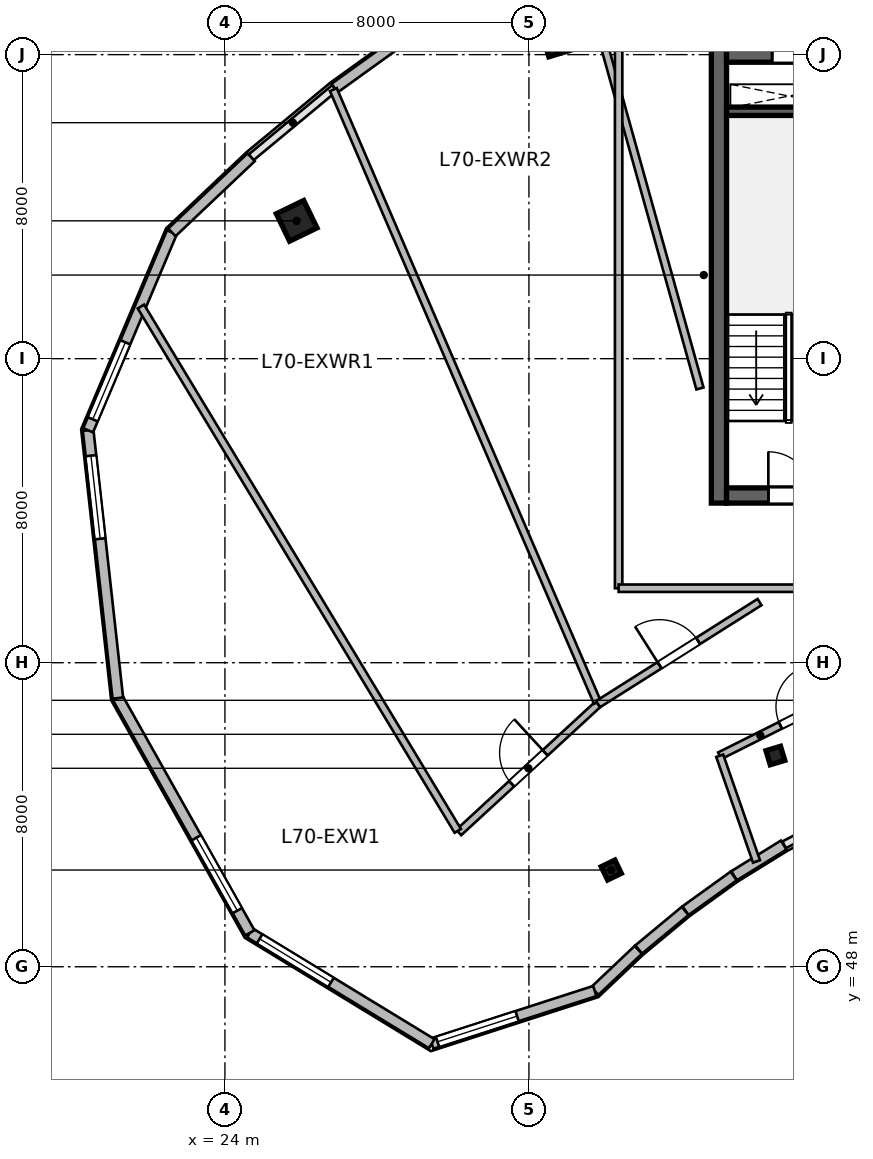
"""IFC4 building model, lengths in metres.
Left out: names, types, materials, properties, quantities, classifications, styles, units other than length and angle.
Written with IfcOpenShell. Run it as: python <this file> out.ifc"""

import sys

from ifc_helpers import new_model, si_unit, direction, frame, frame_2d, origin, origin_2d, place, context, subcontext, project, spatial, rectangle, i_section, extrude, source, transform, mapped, element, fill, save


model = new_model("IFC4")
c1 = context("Model", 3, precision=1e-05, world=origin(), true_north=direction((0.0, 1.0)))
c2 = subcontext(c1, "Body", "Model", "MODEL_VIEW")
j1 = project(units=[si_unit("LENGTHUNIT", "METRE"), si_unit("PLANEANGLEUNIT", "RADIAN")], contexts=[c1])
p1 = place(None, origin())
s1 = spatial("IfcSite", under=j1, at=p1, CompositionType="ELEMENT")
p2 = place(p1, origin())
s2 = spatial("IfcBuilding", under=s1, at=p2, CompositionType="ELEMENT")
p3 = place(p2, frame((0.0, 0.0, 287.4)))
s3 = spatial("IfcBuildingStorey", under=s2, at=p3, CompositionType="ELEMENT", Elevation=287.4)
m1 = source(origin(), c2, "Body", "SweptSolid", [
    extrude(rectangle(XDim=12.0, YDim=0.4, at=frame_2d((6.0, 0.0))), origin(), (0.0, 0.0, 1.0), 3.9),
])
p4 = place(p3, frame((37.0, 60.2, 0.0), z_axis=(0.0, 0.0, 1.0), x_axis=(0.0, 1.0, 0.0)))
e1 = element("IfcWall", 1, at=p4, inside=s3, PredefinedType="SHEAR", context=c2, shape_type="MappedRepresentation", body=[
    mapped(m1, transform((0.0, 0.0, 0.0), scale=1.0)),
])
m2 = source(origin(), c2, "Body", "SweptSolid", [
    extrude(rectangle(XDim=21.6, YDim=0.4, at=frame_2d((10.8, 0.0))), origin(), (0.0, 0.0, 1.0), 3.9),
])
p5 = place(p3, frame((37.2, 60.4, 0.0), z_axis=(0.0, 0.0, 1.0), x_axis=(1.0, 0.0, 0.0)))
e2 = element("IfcWall", 2, at=p5, inside=s3, PredefinedType="SHEAR", context=c2, shape_type="MappedRepresentation", body=[
    mapped(m2, transform((0.0, 0.0, 0.0), scale=1.0)),
])
p6 = place(p5, frame((1.1, 0.0, 0.0)))
e3 = element("IfcOpeningElement", 3, at=p6, cuts=e2, PredefinedType="OPENING", context=c2, shape_type="SweptSolid", body=[
    extrude(rectangle(XDim=1.15, YDim=2.15, at=frame_2d((0.575, 1.075))), frame((0.0, 0.21, 0.0), z_axis=(0.0, -1.0, 0.0), x_axis=(1.0, 0.0, 0.0)), (0.0, 0.0, 1.0), 0.42),
])
p7 = place(p5, frame((19.5, 0.0, 0.0)))
e4 = element("IfcOpeningElement", 4, at=p7, cuts=e2, PredefinedType="OPENING", context=c2, shape_type="SweptSolid", body=[
    extrude(rectangle(XDim=0.9, YDim=2.1, at=frame_2d((0.45, 1.05))), frame((0.0, 0.21, 0.0), z_axis=(0.0, -1.0, 0.0), x_axis=(1.0, 0.0, 0.0)), (0.0, 0.0, 1.0), 0.42),
])
p8 = place(p5, frame((12.02, 0.0, 0.0)))
e5 = element("IfcOpeningElement", 5, at=p8, cuts=e2, PredefinedType="OPENING", context=c2, shape_type="SweptSolid", body=[
    extrude(rectangle(XDim=1.6, YDim=2.15, at=frame_2d((0.8, 1.075))), frame((0.0, 0.21, 0.0), z_axis=(0.0, -1.0, 0.0), x_axis=(1.0, 0.0, 0.0)), (0.0, 0.0, 1.0), 0.42),
])
p9 = place(p3, frame((37.2, 72.0, 0.0), z_axis=(0.0, 0.0, 1.0), x_axis=(1.0, 0.0, 0.0)))
e6 = element("IfcWall", 6, at=p9, inside=s3, PredefinedType="SHEAR", context=c2, shape_type="MappedRepresentation", body=[
    mapped(m2, transform((0.0, 0.0, 0.0), scale=1.0)),
])
p10 = place(p9, frame((1.2, 0.0, 0.0)))
e7 = element("IfcOpeningElement", 7, at=p10, cuts=e6, PredefinedType="OPENING", context=c2, shape_type="SweptSolid", body=[
    extrude(rectangle(XDim=0.9, YDim=2.1, at=frame_2d((0.45, 1.05))), frame((0.0, 0.21, 0.0), z_axis=(0.0, -1.0, 0.0), x_axis=(1.0, 0.0, 0.0)), (0.0, 0.0, 1.0), 0.42),
])
p11 = place(p9, frame((14.7, 0.0, 0.0)))
e8 = element("IfcOpeningElement", 8, at=p11, cuts=e6, PredefinedType="OPENING", context=c2, shape_type="SweptSolid", body=[
    extrude(rectangle(XDim=1.2, YDim=2.15, at=frame_2d((0.6, 1.075))), frame((0.0, 0.21, 0.0), z_axis=(0.0, -1.0, 0.0), x_axis=(1.0, 0.0, 0.0)), (0.0, 0.0, 1.0), 0.42),
])
p12 = place(p9, frame((4.15, 0.0, 0.0)))
e9 = element("IfcOpeningElement", 9, at=p12, cuts=e6, PredefinedType="OPENING", context=c2, shape_type="SweptSolid", body=[
    extrude(rectangle(XDim=1.3, YDim=2.15, at=frame_2d((0.65, 1.075))), frame((0.0, 0.21, 0.0), z_axis=(0.0, -1.0, 0.0), x_axis=(1.0, 0.0, 0.0)), (0.0, 0.0, 1.0), 0.42),
])
p13 = place(p9, frame((7.1, 0.0, 0.0)))
e10 = element("IfcOpeningElement", 10, at=p13, cuts=e6, PredefinedType="OPENING", context=c2, shape_type="SweptSolid", body=[
    extrude(rectangle(XDim=0.9, YDim=2.1, at=frame_2d((0.45, 1.05))), frame((0.0, 0.21, 0.0), z_axis=(0.0, -1.0, 0.0), x_axis=(1.0, 0.0, 0.0)), (0.0, 0.0, 1.0), 0.42),
])
m3 = source(origin(), c2, "Body", "SweptSolid", [
    extrude(rectangle(XDim=3.27, YDim=0.22, at=frame_2d((1.635, 0.0))), origin(), (0.0, 0.0, 1.0), 3.9),
])
p14 = place(p3, frame((37.2, 70.51, 0.0), z_axis=(0.0, 0.0, 1.0), x_axis=(1.0, 0.0, 0.0)))
e11 = element("IfcWall", 11, at=p14, inside=s3, PredefinedType="SHEAR", context=c2, shape_type="MappedRepresentation", body=[
    mapped(m3, transform((0.0, 0.0, 0.0), scale=1.0)),
])
m4 = source(origin(), c2, "Body", "SweptSolid", [
    extrude(i_section(OverallWidth=0.399, OverallDepth=0.387, WebThickness=0.021, FlangeThickness=0.033, at=origin_2d()), origin(), (0.0, 0.0, 1.0), 3.9),
])
p15 = place(p3, frame((34.166, 50.545, 0.0), z_axis=(0.0, 0.0, 1.0), x_axis=(-0.436173672171, 0.899862504889, 0.0)))
e12 = element("IfcColumn", 12, at=p15, inside=s3, PredefinedType="COLUMN", context=c2, shape_type="MappedRepresentation", body=[
    mapped(m4, transform((0.0, 0.0, 0.0), scale=1.0)),
])
m5 = source(origin(), c2, "Body", "SweptSolid", [
    extrude(rectangle(XDim=0.8, YDim=0.8, at=origin_2d()), origin(), (0.0, 0.0, 1.0), 3.9),
])
p16 = place(p3, frame((25.888, 67.627, 0.0), z_axis=(0.0, 0.0, 1.0), x_axis=(-0.436173672171, 0.899862504889, 0.0)))
e13 = element("IfcColumn", 13, at=p16, inside=s3, PredefinedType="COLUMN", context=c2, shape_type="MappedRepresentation", body=[
    mapped(m5, transform((0.0, 0.0, 0.0), scale=1.0)),
])
p17 = place(p3, frame((38.485, 53.558, 0.0), z_axis=(0.0, 0.0, 1.0), x_axis=(-0.288697611798, 0.957420330337, 0.0)))
e14 = element("IfcColumn", 14, at=p17, inside=s3, PredefinedType="COLUMN", context=c2, shape_type="MappedRepresentation", body=[
    mapped(m4, transform((0.0, 0.0, 0.0), scale=1.0)),
])
p18 = place(p3, frame((32.791, 72.442, 0.0), z_axis=(0.0, 0.0, 1.0), x_axis=(-0.288697611798, 0.957420330337, 0.0)))
e15 = element("IfcColumn", 15, at=p18, inside=s3, PredefinedType="COLUMN", context=c2, shape_type="MappedRepresentation", body=[
    mapped(m5, transform((0.0, 0.0, 0.0), scale=1.0)),
])
m6 = source(origin(), c2, "Body", "SweptSolid", [
    extrude(rectangle(XDim=1.535, YDim=0.28, at=frame_2d((0.768, 0.0))), origin(), (0.0, 0.0, 1.0), 3.64),
])
p19 = place(p3, frame((38.704, 51.201, 0.0), z_axis=(0.0, 0.0, 1.0), x_axis=(-0.850756173541, -0.525560589449, 0.0)))
e16 = element("IfcWall", 16, at=p19, inside=s3, PredefinedType="SOLIDWALL", context=c2, shape_type="MappedRepresentation", body=[
    mapped(m6, transform((0.0, 0.0, 0.0), scale=1.0)),
])
m7 = source(origin(), c2, "Body", "SweptSolid", [
    extrude(rectangle(XDim=1.561, YDim=0.28, at=frame_2d((0.781, 0.0))), origin(), (0.0, 0.0, 1.0), 3.64),
])
p20 = place(p3, frame((37.387, 50.387, 0.0), z_axis=(0.0, 0.0, 1.0), x_axis=(-0.81154027425, -0.584296485758, 0.0)))
e17 = element("IfcWall", 17, at=p20, inside=s3, PredefinedType="SOLIDWALL", context=c2, shape_type="MappedRepresentation", body=[
    mapped(m7, transform((0.0, 0.0, 0.0), scale=1.0)),
])
m8 = source(origin(), c2, "Body", "SweptSolid", [
    extrude(rectangle(XDim=1.589, YDim=0.28, at=frame_2d((0.794, 0.0))), origin(), (0.0, 0.0, 1.0), 3.64),
])
p21 = place(p3, frame((36.11, 49.468, 0.0), z_axis=(0.0, 0.0, 1.0), x_axis=(-0.769805836273, -0.63827813251, 0.0)))
e18 = element("IfcWall", 18, at=p21, inside=s3, PredefinedType="SOLIDWALL", context=c2, shape_type="MappedRepresentation", body=[
    mapped(m8, transform((0.0, 0.0, 0.0), scale=1.0)),
])
m9 = source(origin(), c2, "Body", "SweptSolid", [
    extrude(rectangle(XDim=1.577, YDim=0.28, at=frame_2d((0.789, 0.0))), origin(), (0.0, 0.0, 1.0), 3.64),
])
p22 = place(p3, frame((34.878, 48.446, 0.0), z_axis=(0.0, 0.0, 1.0), x_axis=(-0.726119464467, -0.687568558998, 0.0)))
e19 = element("IfcWall", 19, at=p22, inside=s3, PredefinedType="SOLIDWALL", context=c2, shape_type="MappedRepresentation", body=[
    mapped(m9, transform((0.0, 0.0, 0.0), scale=1.0)),
])
m10 = source(origin(), c2, "Body", "SweptSolid", [
    extrude(rectangle(XDim=4.509, YDim=0.28, at=frame_2d((2.255, 0.0))), origin(), (0.0, 0.0, 1.0), 3.64),
])
p23 = place(p3, frame((33.733, 47.361, 0.0), z_axis=(0.0, 0.0, 1.0), x_axis=(-0.95162949292, -0.307247958828, 0.0)))
e20 = element("IfcWall", 20, at=p23, inside=s3, PredefinedType="SOLIDWALL", context=c2, shape_type="MappedRepresentation", body=[
    mapped(m10, transform((0.0, 0.0, 0.0), scale=1.0)),
])
p24 = place(p23, frame((2.149, 0.0, 0.95)))
e21 = element("IfcOpeningElement", 21, at=p24, cuts=e20, PredefinedType="OPENING", context=c2, shape_type="SweptSolid", body=[
    extrude(rectangle(XDim=2.2, YDim=2.1, at=frame_2d((1.1, 1.05))), frame((0.0, 0.15, 0.0), z_axis=(0.0, -1.0, 0.0), x_axis=(1.0, 0.0, 0.0)), (0.0, 0.0, 1.0), 0.3),
])
m11 = source(origin(), c2, "Body", "SweptSolid", [
    extrude(rectangle(XDim=5.604, YDim=0.28, at=frame_2d((2.802, 0.0))), origin(), (0.0, 0.0, 1.0), 3.64),
])
p25 = place(p3, frame((29.442, 45.976, 0.0), z_axis=(0.0, 0.0, 1.0), x_axis=(-0.854002492971, 0.520268913158, 0.0)))
e22 = element("IfcWall", 22, at=p25, inside=s3, PredefinedType="SOLIDWALL", context=c2, shape_type="MappedRepresentation", body=[
    mapped(m11, transform((0.0, 0.0, 0.0), scale=1.0)),
])
p26 = place(p25, frame((3.103, 0.0, 0.95)))
e23 = element("IfcOpeningElement", 23, at=p26, cuts=e22, PredefinedType="OPENING", context=c2, shape_type="SweptSolid", body=[
    extrude(rectangle(XDim=2.2, YDim=2.1, at=frame_2d((1.1, 1.05))), frame((0.0, 0.15, 0.0), z_axis=(0.0, -1.0, 0.0), x_axis=(1.0, 0.0, 0.0)), (0.0, 0.0, 1.0), 0.3),
])
m12 = source(origin(), c2, "Body", "SweptSolid", [
    extrude(rectangle(XDim=7.087, YDim=0.28, at=frame_2d((3.543, 0.0))), origin(), (0.0, 0.0, 1.0), 3.64),
])
p27 = place(p3, frame((24.656, 48.892, 0.0), z_axis=(0.0, 0.0, 1.0), x_axis=(-0.490158199368, 0.871633489256, 0.0)))
e24 = element("IfcWall", 24, at=p27, inside=s3, PredefinedType="SOLIDWALL", context=c2, shape_type="MappedRepresentation", body=[
    mapped(m12, transform((0.0, 0.0, 0.0), scale=1.0)),
])
p28 = place(p27, frame((0.672, 0.0, 0.95)))
e25 = element("IfcOpeningElement", 25, at=p28, cuts=e24, PredefinedType="OPENING", context=c2, shape_type="SweptSolid", body=[
    extrude(rectangle(XDim=2.2, YDim=2.1, at=frame_2d((1.1, 1.05))), frame((0.0, 0.15, 0.0), z_axis=(0.0, -1.0, 0.0), x_axis=(1.0, 0.0, 0.0)), (0.0, 0.0, 1.0), 0.3),
])
m13 = source(origin(), c2, "Body", "SweptSolid", [
    extrude(rectangle(XDim=7.09, YDim=0.28, at=frame_2d((3.545, 0.0))), origin(), (0.0, 0.0, 1.0), 3.64),
])
p29 = place(p3, frame((21.182, 55.069, 0.0), z_axis=(0.0, 0.0, 1.0), x_axis=(-0.110159396922, 0.993913933532, 0.0)))
e26 = element("IfcWall", 26, at=p29, inside=s3, PredefinedType="SOLIDWALL", context=c2, shape_type="MappedRepresentation", body=[
    mapped(m13, transform((0.0, 0.0, 0.0), scale=1.0)),
])
p30 = place(p29, frame((4.217, 0.0, 0.95)))
e27 = element("IfcOpeningElement", 27, at=p30, cuts=e26, PredefinedType="OPENING", context=c2, shape_type="SweptSolid", body=[
    extrude(rectangle(XDim=2.2, YDim=2.1, at=frame_2d((1.1, 1.05))), frame((0.0, 0.15, 0.0), z_axis=(0.0, -1.0, 0.0), x_axis=(1.0, 0.0, 0.0)), (0.0, 0.0, 1.0), 0.3),
])
m14 = source(origin(), c2, "Body", "SweptSolid", [
    extrude(rectangle(XDim=5.655, YDim=0.28, at=frame_2d((2.828, 0.0))), origin(), (0.0, 0.0, 1.0), 3.64),
])
p31 = place(p3, frame((20.401, 62.116, 0.0), z_axis=(0.0, 0.0, 1.0), x_axis=(0.389585063528, 0.920990487614, 0.0)))
e28 = element("IfcWall", 28, at=p31, inside=s3, PredefinedType="SOLIDWALL", context=c2, shape_type="MappedRepresentation", body=[
    mapped(m14, transform((0.0, 0.0, 0.0), scale=1.0)),
])
p32 = place(p31, frame((0.314, 0.0, 0.95)))
e29 = element("IfcOpeningElement", 29, at=p32, cuts=e28, PredefinedType="OPENING", context=c2, shape_type="SweptSolid", body=[
    extrude(rectangle(XDim=2.2, YDim=2.1, at=frame_2d((1.1, 1.05))), frame((0.0, 0.15, 0.0), z_axis=(0.0, -1.0, 0.0), x_axis=(1.0, 0.0, 0.0)), (0.0, 0.0, 1.0), 0.3),
])
m15 = source(origin(), c2, "Body", "SweptSolid", [
    extrude(rectangle(XDim=2.873, YDim=0.28, at=frame_2d((1.436, 0.0))), origin(), (0.0, 0.0, 1.0), 3.64),
])
p33 = place(p3, frame((22.604, 67.324, 0.0), z_axis=(0.0, 0.0, 1.0), x_axis=(0.72609560544, 0.687593754888, 0.0)))
e30 = element("IfcWall", 30, at=p33, inside=s3, PredefinedType="SOLIDWALL", context=c2, shape_type="MappedRepresentation", body=[
    mapped(m15, transform((0.0, 0.0, 0.0), scale=1.0)),
])
m16 = source(origin(), c2, "Body", "SweptSolid", [
    extrude(rectangle(XDim=2.802, YDim=0.28, at=frame_2d((1.401, 0.0))), origin(), (0.0, 0.0, 1.0), 3.64),
])
p34 = place(p3, frame((26.885, 71.12, 0.0), z_axis=(0.0, 0.0, 1.0), x_axis=(0.811507896482, 0.584341453217, 0.0)))
e31 = element("IfcWall", 31, at=p34, inside=s3, PredefinedType="SOLIDWALL", context=c2, shape_type="MappedRepresentation", body=[
    mapped(m16, transform((0.0, 0.0, 0.0), scale=1.0)),
])
m17 = source(origin(), c2, "Body", "SweptSolid", [
    extrude(rectangle(XDim=4.271, YDim=0.195, at=frame_2d((2.135, 0.0))), origin(), (0.0, 0.0, 1.0), 3.64),
])
p35 = place(p3, frame((37.021, 53.552, 0.0), z_axis=(0.0, 0.0, 1.0), x_axis=(0.894061035522, 0.447945158207, 0.0)))
e32 = element("IfcWall", 32, at=p35, inside=s3, PredefinedType="PARTITIONING", context=c2, shape_type="MappedRepresentation", body=[
    mapped(m17, transform((0.0, 0.0, 0.0), scale=1.0)),
])
p36 = place(p35, frame((1.785, 0.0, 0.0)))
e33 = element("IfcOpeningElement", 33, at=p36, cuts=e32, PredefinedType="OPENING", context=c2, shape_type="SweptSolid", body=[
    extrude(rectangle(XDim=1.1, YDim=2.15, at=frame_2d((0.55, 1.075))), frame((0.0, 0.107, 0.0), z_axis=(0.0, -1.0, 0.0), x_axis=(1.0, 0.0, 0.0)), (0.0, 0.0, 1.0), 0.215),
])
m18 = source(origin(), c2, "Body", "SweptSolid", [
    extrude(rectangle(XDim=2.944, YDim=0.195, at=frame_2d((1.472, 0.0))), origin(), (0.0, 0.0, 1.0), 3.64),
])
p37 = place(p3, frame((37.988, 50.771, 0.0), z_axis=(0.0, 0.0, 1.0), x_axis=(-0.328565655286, 0.944481132774, 0.0)))
e34 = element("IfcWall", 34, at=p37, inside=s3, PredefinedType="PARTITIONING", context=c2, shape_type="MappedRepresentation", body=[
    mapped(m18, transform((0.0, 0.0, 0.0), scale=1.0)),
])
m19 = source(origin(), c2, "Body", "SweptSolid", [
    extrude(rectangle(XDim=4.986, YDim=0.195, at=frame_2d((2.493, 0.0))), origin(), (0.0, 0.0, 1.0), 3.64),
])
p38 = place(p3, frame((30.153, 51.533, 0.0), z_axis=(0.0, 0.0, 1.0), x_axis=(0.735595190169, 0.677421372707, 0.0)))
e35 = element("IfcWall", 35, at=p38, inside=s3, PredefinedType="PARTITIONING", context=c2, shape_type="MappedRepresentation", body=[
    mapped(m19, transform((0.0, 0.0, 0.0), scale=1.0)),
])
p39 = place(p38, frame((1.893, 0.0, 0.0)))
e36 = element("IfcOpeningElement", 36, at=p39, cuts=e35, PredefinedType="OPENING", context=c2, shape_type="SweptSolid", body=[
    extrude(rectangle(XDim=1.2, YDim=2.15, at=frame_2d((0.6, 1.075))), frame((0.0, 0.107, 0.0), z_axis=(0.0, -1.0, 0.0), x_axis=(1.0, 0.0, 0.0)), (0.0, 0.0, 1.0), 0.215),
])
m20 = source(origin(), c2, "Body", "SweptSolid", [
    extrude(rectangle(XDim=16.121, YDim=0.195, at=frame_2d((8.061, 0.0))), origin(), (0.0, 0.0, 1.0), 3.64),
])
p40 = place(p3, frame((30.127, 51.575, 0.0), z_axis=(0.0, 0.0, 1.0), x_axis=(-0.517212483904, 0.855857024563, 0.0)))
e37 = element("IfcWall", 37, at=p40, inside=s3, PredefinedType="PARTITIONING", context=c2, shape_type="MappedRepresentation", body=[
    mapped(m20, transform((0.0, 0.0, 0.0), scale=1.0)),
])
m21 = source(origin(), c2, "Body", "SweptSolid", [
    extrude(rectangle(XDim=17.556, YDim=0.195, at=frame_2d((8.778, 0.0))), origin(), (0.0, 0.0, 1.0), 3.64),
])
p41 = place(p3, frame((33.8, 54.958, 0.0), z_axis=(0.0, 0.0, 1.0), x_axis=(-0.395687598313, 0.918385172213, 0.0)))
e38 = element("IfcWall", 38, at=p41, inside=s3, PredefinedType="PARTITIONING", context=c2, shape_type="MappedRepresentation", body=[
    mapped(m21, transform((0.0, 0.0, 0.0), scale=1.0)),
])
m22 = source(origin(), c2, "Body", "SweptSolid", [
    extrude(rectangle(XDim=5.025, YDim=0.195, at=frame_2d((2.513, 0.0))), origin(), (0.0, 0.0, 1.0), 3.64),
])
p42 = place(p3, frame((33.82, 54.911, 0.0), z_axis=(0.0, 0.0, 1.0), x_axis=(0.84532378062, 0.534254345717, 0.0)))
e39 = element("IfcWall", 39, at=p42, inside=s3, PredefinedType="PARTITIONING", context=c2, shape_type="MappedRepresentation", body=[
    mapped(m22, transform((0.0, 0.0, 0.0), scale=1.0)),
])
p43 = place(p42, frame((1.913, 0.0, 0.0)))
e40 = element("IfcOpeningElement", 40, at=p43, cuts=e39, PredefinedType="OPENING", context=c2, shape_type="SweptSolid", body=[
    extrude(rectangle(XDim=1.2, YDim=2.15, at=frame_2d((0.6, 1.075))), frame((0.0, 0.107, 0.0), z_axis=(0.0, -1.0, 0.0), x_axis=(1.0, 0.0, 0.0)), (0.0, 0.0, 1.0), 0.215),
])
m23 = source(origin(), c2, "Body", "SweptSolid", [
    extrude(rectangle(XDim=12.311, YDim=0.195, at=frame_2d((6.155, 0.0))), origin(), (0.0, 0.0, 1.0), 3.64),
])
p44 = place(p3, frame((36.5, 63.216, 0.0), z_axis=(0.0, 0.0, 1.0), x_axis=(-0.268759602651, 0.963207286093, 0.0)))
e41 = element("IfcWall", 41, at=p44, inside=s3, PredefinedType="PARTITIONING", context=c2, shape_type="MappedRepresentation", body=[
    mapped(m23, transform((0.0, 0.0, 0.0), scale=1.0)),
])
m24 = source(origin(), c2, "Body", "SweptSolid", [
    extrude(rectangle(XDim=17.681, YDim=0.195, at=frame_2d((8.84, 0.0))), origin(), (0.0, 0.0, 1.0), 3.64),
])
p45 = place(p3, frame((34.36, 57.96, 0.0), z_axis=(0.0, 0.0, 1.0), x_axis=(0.0, 1.0, 0.0)))
e42 = element("IfcWall", 42, at=p45, inside=s3, PredefinedType="PARTITIONING", context=c2, shape_type="MappedRepresentation", body=[
    mapped(m24, transform((0.0, 0.0, 0.0), scale=1.0)),
])
m25 = source(origin(), c2, "Body", "SweptSolid", [
    extrude(rectangle(XDim=12.39, YDim=0.195, at=frame_2d((6.195, 0.0))), origin(), (0.0, 0.0, 1.0), 3.64),
])
p46 = place(p3, frame((34.36, 57.96, 0.0), z_axis=(0.0, 0.0, 1.0), x_axis=(1.0, 0.0, 0.0)))
e43 = element("IfcWall", 43, at=p46, inside=s3, PredefinedType="PARTITIONING", context=c2, shape_type="MappedRepresentation", body=[
    mapped(m25, transform((0.0, 0.0, 0.0), scale=1.0)),
])
m26 = source(origin(), c2, "Body", "SweptSolid", [
    extrude(rectangle(XDim=2.2, YDim=2.1, at=frame_2d((1.1, 1.05))), frame((0.0, 0.03, 0.0), z_axis=(0.0, -1.0, 0.0), x_axis=(1.0, 0.0, 0.0)), (0.0, 0.0, 1.0), 0.06),
])
p47 = place(p24, origin())
e44 = element("IfcWindow", 44, at=p47, inside=s3, PartitioningType="TRIPLE_PANEL_VERTICAL", PredefinedType="WINDOW", context=c2, shape_type="MappedRepresentation", body=[
    mapped(m26, transform((0.0, 0.0, 0.0), scale=1.0)),
])
fill(e21, e44)
p48 = place(p26, origin())
e45 = element("IfcWindow", 45, at=p48, inside=s3, PartitioningType="TRIPLE_PANEL_VERTICAL", PredefinedType="WINDOW", context=c2, shape_type="MappedRepresentation", body=[
    mapped(m26, transform((0.0, 0.0, 0.0), scale=1.0)),
])
fill(e23, e45)
p49 = place(p28, origin())
e46 = element("IfcWindow", 46, at=p49, inside=s3, PartitioningType="TRIPLE_PANEL_VERTICAL", PredefinedType="WINDOW", context=c2, shape_type="MappedRepresentation", body=[
    mapped(m26, transform((0.0, 0.0, 0.0), scale=1.0)),
])
fill(e25, e46)
p50 = place(p30, origin())
e47 = element("IfcWindow", 47, at=p50, inside=s3, PartitioningType="TRIPLE_PANEL_VERTICAL", PredefinedType="WINDOW", context=c2, shape_type="MappedRepresentation", body=[
    mapped(m26, transform((0.0, 0.0, 0.0), scale=1.0)),
])
fill(e27, e47)
p51 = place(p32, origin())
e48 = element("IfcWindow", 48, at=p51, inside=s3, PartitioningType="TRIPLE_PANEL_VERTICAL", PredefinedType="WINDOW", context=c2, shape_type="MappedRepresentation", body=[
    mapped(m26, transform((0.0, 0.0, 0.0), scale=1.0)),
])
fill(e29, e48)
m27 = source(origin(), c2, "Body", "SweptSolid", [
    extrude(rectangle(XDim=1.15, YDim=2.15, at=frame_2d((0.575, 1.075))), frame((0.0, 0.025, 0.0), z_axis=(0.0, -1.0, 0.0), x_axis=(1.0, 0.0, 0.0)), (0.0, 0.0, 1.0), 0.05),
])
p52 = place(p6, origin())
e49 = element("IfcDoor", 49, at=p52, inside=s3, OperationType="SINGLE_SWING_LEFT", PredefinedType="DOOR", context=c2, shape_type="MappedRepresentation", body=[
    mapped(m27, transform((0.0, 0.0, 0.0), scale=1.0)),
])
fill(e3, e49)
m28 = source(origin(), c2, "Body", "SweptSolid", [
    extrude(rectangle(XDim=0.9, YDim=2.1, at=frame_2d((0.45, 1.05))), frame((0.0, 0.025, 0.0), z_axis=(0.0, -1.0, 0.0), x_axis=(1.0, 0.0, 0.0)), (0.0, 0.0, 1.0), 0.05),
])
p53 = place(p10, origin())
e50 = element("IfcDoor", 50, at=p53, inside=s3, OperationType="SINGLE_SWING_LEFT", PredefinedType="DOOR", context=c2, shape_type="MappedRepresentation", body=[
    mapped(m28, transform((0.0, 0.0, 0.0), scale=1.0)),
])
fill(e7, e50)
m29 = source(origin(), c2, "Body", "SweptSolid", [
    extrude(rectangle(XDim=1.1, YDim=2.15, at=frame_2d((0.55, 1.075))), frame((0.0, 0.025, 0.0), z_axis=(0.0, -1.0, 0.0), x_axis=(1.0, 0.0, 0.0)), (0.0, 0.0, 1.0), 0.05),
])
p54 = place(p36, origin())
e51 = element("IfcDoor", 51, at=p54, inside=s3, OperationType="SINGLE_SWING_RIGHT", PredefinedType="DOOR", context=c2, shape_type="MappedRepresentation", body=[
    mapped(m29, transform((0.0, 0.0, 0.0), scale=1.0)),
])
fill(e33, e51)
m30 = source(origin(), c2, "Body", "SweptSolid", [
    extrude(rectangle(XDim=1.2, YDim=2.15, at=frame_2d((0.6, 1.075))), frame((0.0, 0.025, 0.0), z_axis=(0.0, -1.0, 0.0), x_axis=(1.0, 0.0, 0.0)), (0.0, 0.0, 1.0), 0.05),
])
p55 = place(p39, origin())
e52 = element("IfcDoor", 52, at=p55, inside=s3, OperationType="SINGLE_SWING_RIGHT", PredefinedType="DOOR", context=c2, shape_type="MappedRepresentation", body=[
    mapped(m30, transform((0.0, 0.0, 0.0), scale=1.0)),
])
fill(e36, e52)
p56 = place(p43, origin())
e53 = element("IfcDoor", 53, at=p56, inside=s3, OperationType="SINGLE_SWING_LEFT", PredefinedType="DOOR", context=c2, shape_type="MappedRepresentation", body=[
    mapped(m30, transform((0.0, 0.0, 0.0), scale=1.0)),
])
fill(e40, e53)
save(model, sys.argv[1])
